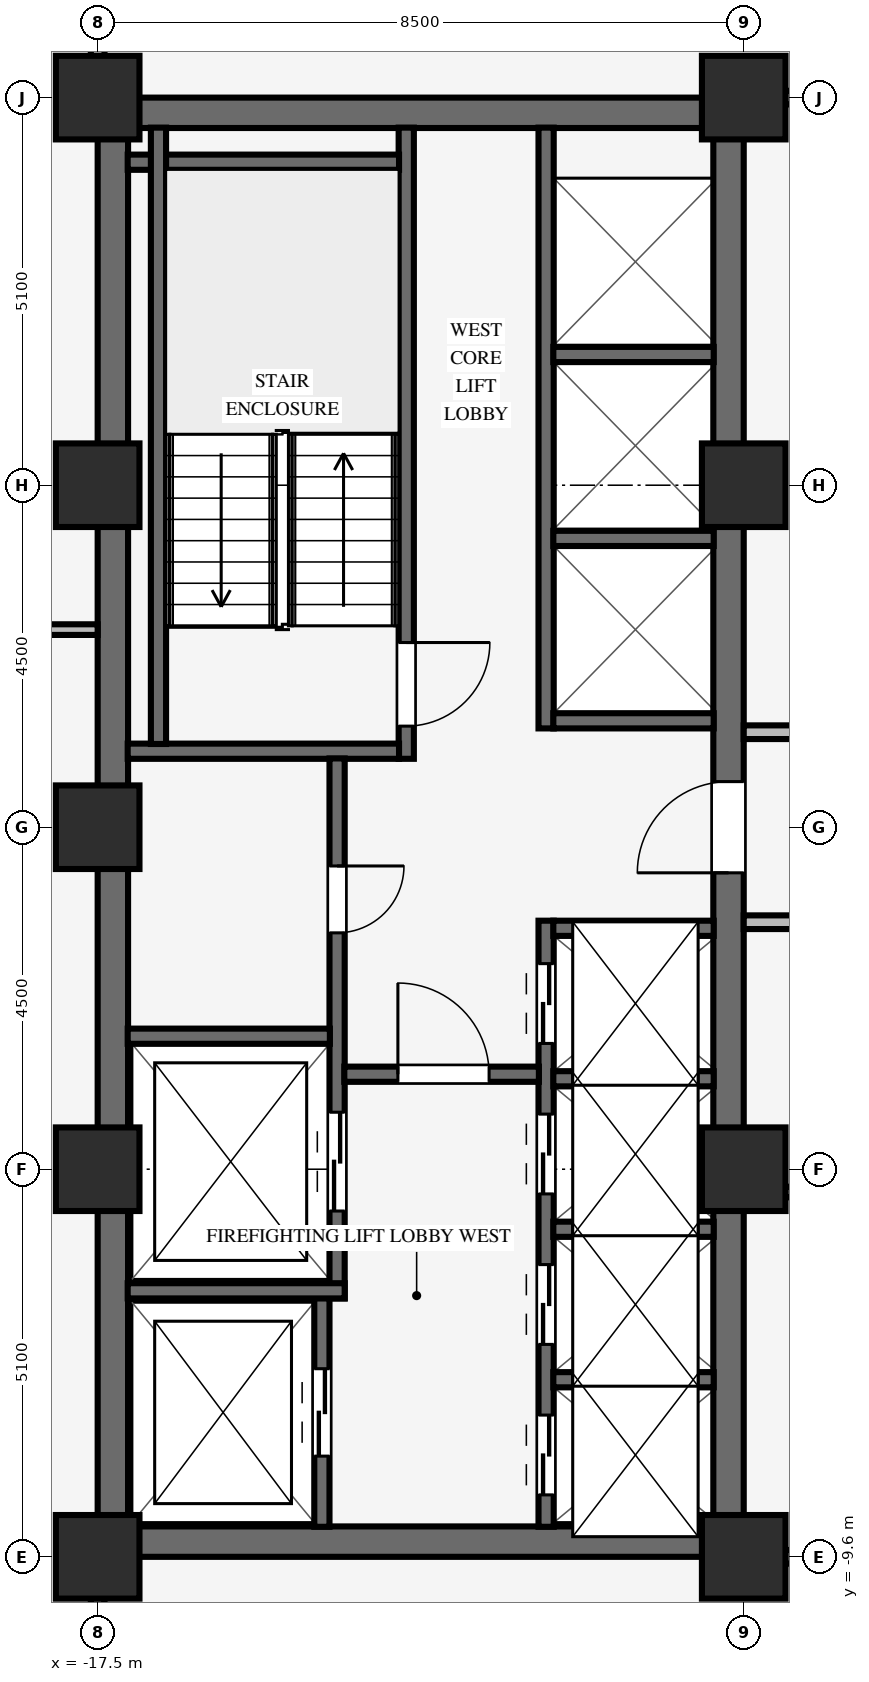
"""IFC4 building model, lengths in metres.
Left out: names, types, materials, properties, quantities, classifications, styles, units other than length and angle.
Written with IfcOpenShell. Run it as: python <this file> out.ifc"""

import sys

from ifc_helpers import new_model, si_unit, direction, frame, frame_2d, origin, origin_2d, place, context, subcontext, project, spatial, rectangle, extrude, source, transform, mapped, element, fill, save


model = new_model("IFC4")
c1 = context("Model", 3, precision=1e-05, world=origin(), true_north=direction((0.0, 1.0)))
c2 = subcontext(c1, "Body", "Model", "MODEL_VIEW")
j1 = project(units=[si_unit("LENGTHUNIT", "METRE"), si_unit("PLANEANGLEUNIT", "RADIAN")], contexts=[c1])
p1 = place(None, origin())
s1 = spatial("IfcSite", under=j1, at=p1, CompositionType="ELEMENT")
p2 = place(p1, origin())
s2 = spatial("IfcBuilding", under=s1, at=p2, CompositionType="ELEMENT")
p3 = place(p2, frame((0.0, 0.0, 112.9)))
s3 = spatial("IfcBuildingStorey", under=s2, at=p3, CompositionType="ELEMENT", Elevation=112.9)
for number, where, z_axis, x_axis in (
    (1, (-17.5, -9.4, 0.0), (0.0, 0.0, 1.0), (1.0, 0.0, 0.0)),
    (2, (-17.5, 9.4, 0.0), (0.0, 0.0, 1.0), (1.0, 0.0, 0.0)),
):
    element("IfcWall", number, at=place(p3, frame(where, z_axis=z_axis, x_axis=x_axis)), inside=s3, PredefinedType="SHEAR", context=c2, shape_type="SweptSolid", body=[
        extrude(rectangle(XDim=8.5, YDim=0.4, at=frame_2d((4.25, 0.0))), origin(), (0.0, 0.0, 1.0), 3.25),
    ])
p4 = place(p3, frame((-17.3, -9.205, 0.0), z_axis=(0.0, 0.0, 1.0), x_axis=(0.0, 1.0, 0.0)))
e3 = element("IfcWall", 3, at=p4, inside=s3, PredefinedType="SHEAR", context=c2, shape_type="SweptSolid", body=[
    extrude(rectangle(XDim=18.41, YDim=0.4, at=frame_2d((9.205, 0.0))), origin(), (0.0, 0.0, 1.0), 3.25),
])
p5 = place(p3, frame((-9.2, -9.205, 0.0), z_axis=(0.0, 0.0, 1.0), x_axis=(0.0, 1.0, 0.0)))
e4 = element("IfcWall", 4, at=p5, inside=s3, PredefinedType="SHEAR", context=c2, shape_type="SweptSolid", body=[
    extrude(rectangle(XDim=18.41, YDim=0.4, at=frame_2d((9.205, 0.0))), origin(), (0.0, 0.0, 1.0), 3.25),
])
p6 = place(p5, frame((8.605, 0.0, 0.0)))
e5 = element("IfcOpeningElement", 5, at=p6, cuts=e4, PredefinedType="OPENING", context=c2, shape_type="SweptSolid", body=[
    extrude(rectangle(XDim=1.2, YDim=2.15, at=frame_2d((0.6, 1.075))), frame((0.0, 0.21, 0.0), z_axis=(0.0, -1.0, 0.0), x_axis=(1.0, 0.0, 0.0)), (0.0, 0.0, 1.0), 0.42),
])
for number, where, z_axis, x_axis in (
    (6, (-17.5, -9.6, 0.0), (0.0, 0.0, 1.0), (1.0, 0.0, 0.0)),
    (7, (-17.5, -4.5, 0.0), (0.0, 0.0, 1.0), (1.0, 0.0, 0.0)),
    (8, (-17.5, 4.5, 0.0), (0.0, 0.0, 1.0), (1.0, 0.0, 0.0)),
    (9, (-17.5, 9.6, 0.0), (0.0, 0.0, 1.0), (1.0, 0.0, 0.0)),
    (10, (-9.0, -9.6, 0.0), (0.0, 0.0, 1.0), (1.0, 0.0, 0.0)),
    (11, (-9.0, -4.5, 0.0), (0.0, 0.0, 1.0), (1.0, 0.0, 0.0)),
    (12, (-9.0, 4.5, 0.0), (0.0, 0.0, 1.0), (1.0, 0.0, 0.0)),
    (13, (-9.0, 9.6, 0.0), (0.0, 0.0, 1.0), (1.0, 0.0, 0.0)),
    (14, (-17.5, 0.0, 0.0), (0.0, 0.0, 1.0), (1.0, 0.0, 0.0)),
):
    element("IfcColumn", number, at=place(p3, frame(where, z_axis=z_axis, x_axis=x_axis)), inside=s3, PredefinedType="COLUMN", context=c2, shape_type="SweptSolid", body=[
        extrude(rectangle(XDim=1.1, YDim=1.1, at=origin_2d()), origin(), (0.0, 0.0, 1.0), 3.25),
    ])
p7 = place(p3, frame((-13.44, 0.9, 0.0), z_axis=(0.0, 0.0, 1.0), x_axis=(0.0, 1.0, 0.0)))
e15 = element("IfcWall", 15, at=p7, inside=s3, PredefinedType="SHEAR", context=c2, shape_type="SweptSolid", body=[
    extrude(rectangle(XDim=8.305, YDim=0.2, at=frame_2d((4.153, 0.0))), origin(), (0.0, 0.0, 1.0), 3.25),
])
p8 = place(p7, frame((1.53, 0.0, 0.0), z_axis=(0.0, 0.0, 1.0), x_axis=(-1.0, 0.0, 0.0)))
e16 = element("IfcOpeningElement", 16, at=p8, cuts=e15, PredefinedType="OPENING", context=c2, shape_type="SweptSolid", body=[
    extrude(rectangle(XDim=1.1, YDim=2.15, at=frame_2d((0.55, 1.075))), frame((0.0, 0.11, 0.0), z_axis=(0.0, -1.0, 0.0), x_axis=(1.0, 0.0, 0.0)), (0.0, 0.0, 1.0), 0.22),
])
for number, where, z_axis, x_axis in (
    (17, (-17.105, 1.0, 0.0), (0.0, 0.0, 1.0), (1.0, 0.0, 0.0)),
    (18, (-17.105, 8.75, 0.0), (0.0, 0.0, 1.0), (1.0, 0.0, 0.0)),
):
    element("IfcWall", number, at=place(p3, frame(where, z_axis=z_axis, x_axis=x_axis)), inside=s3, PredefinedType="SHEAR", context=c2, shape_type="SweptSolid", body=[
        extrude(rectangle(XDim=3.57, YDim=0.2, at=frame_2d((1.785, 0.0))), origin(), (0.0, 0.0, 1.0), 3.25),
    ])
p9 = place(p3, frame((-16.7, 1.095, 0.0), z_axis=(0.0, 0.0, 1.0), x_axis=(0.0, 1.0, 0.0)))
e19 = element("IfcWall", 19, at=p9, inside=s3, PredefinedType="SHEAR", context=c2, shape_type="SweptSolid", body=[
    extrude(rectangle(XDim=8.11, YDim=0.2, at=frame_2d((4.055, 0.0))), origin(), (0.0, 0.0, 1.0), 3.25),
])
p10 = place(p3, frame((-14.55, -9.205, 0.0), z_axis=(0.0, 0.0, 1.0), x_axis=(0.0, 1.0, 0.0)))
e20 = element("IfcWall", 20, at=p10, inside=s3, PredefinedType="SHEAR", context=c2, shape_type="SweptSolid", body=[
    extrude(rectangle(XDim=3.01, YDim=0.2, at=frame_2d((1.505, 0.0))), origin(), (0.0, 0.0, 1.0), 3.25),
])
p11 = place(p10, frame((0.93, 0.0, 0.0)))
e21 = element("IfcOpeningElement", 21, at=p11, cuts=e20, PredefinedType="OPENING", context=c2, shape_type="SweptSolid", body=[
    extrude(rectangle(XDim=1.15, YDim=2.15, at=frame_2d((0.575, 1.075))), frame((0.0, 0.11, 0.0), z_axis=(0.0, -1.0, 0.0), x_axis=(1.0, 0.0, 0.0)), (0.0, 0.0, 1.0), 0.22),
])
p12 = place(p3, frame((-14.35, -6.2, 0.0), z_axis=(0.0, 0.0, 1.0), x_axis=(0.0, 1.0, 0.0)))
e22 = element("IfcWall", 22, at=p12, inside=s3, PredefinedType="SHEAR", context=c2, shape_type="SweptSolid", body=[
    extrude(rectangle(XDim=7.105, YDim=0.2, at=frame_2d((3.552, 0.0))), origin(), (0.0, 0.0, 1.0), 3.25),
])
p13 = place(p12, frame((5.69, 0.0, 0.0), z_axis=(0.0, 0.0, 1.0), x_axis=(-1.0, 0.0, 0.0)))
e23 = element("IfcOpeningElement", 23, at=p13, cuts=e22, PredefinedType="OPENING", context=c2, shape_type="SweptSolid", body=[
    extrude(rectangle(XDim=0.88, YDim=2.1, at=frame_2d((0.44, 1.05))), frame((0.0, 0.11, 0.0), z_axis=(0.0, -1.0, 0.0), x_axis=(1.0, 0.0, 0.0)), (0.0, 0.0, 1.0), 0.22),
])
p14 = place(p12, frame((1.15, 0.0, 0.0)))
e24 = element("IfcOpeningElement", 24, at=p14, cuts=e22, PredefinedType="OPENING", context=c2, shape_type="SweptSolid", body=[
    extrude(rectangle(XDim=1.3, YDim=2.2, at=frame_2d((0.65, 1.1))), frame((0.0, 0.11, 0.0), z_axis=(0.0, -1.0, 0.0), x_axis=(1.0, 0.0, 0.0)), (0.0, 0.0, 1.0), 0.22),
])
p15 = place(p3, frame((-17.105, -6.1, 0.0), z_axis=(0.0, 0.0, 1.0), x_axis=(1.0, 0.0, 0.0)))
e25 = element("IfcWall", 25, at=p15, inside=s3, PredefinedType="SHEAR", context=c2, shape_type="SweptSolid", body=[
    extrude(rectangle(XDim=2.855, YDim=0.2, at=frame_2d((1.427, 0.0))), origin(), (0.0, 0.0, 1.0), 3.25),
])
p16 = place(p3, frame((-17.105, -2.75, 0.0), z_axis=(0.0, 0.0, 1.0), x_axis=(1.0, 0.0, 0.0)))
e26 = element("IfcWall", 26, at=p16, inside=s3, PredefinedType="SHEAR", context=c2, shape_type="SweptSolid", body=[
    extrude(rectangle(XDim=2.66, YDim=0.2, at=frame_2d((1.33, 0.0))), origin(), (0.0, 0.0, 1.0), 3.25),
])
p17 = place(p3, frame((-11.6, -9.205, 0.0), z_axis=(0.0, 0.0, 1.0), x_axis=(0.0, 1.0, 0.0)))
e27 = element("IfcWall", 27, at=p17, inside=s3, PredefinedType="SHEAR", context=c2, shape_type="SweptSolid", body=[
    extrude(rectangle(XDim=7.975, YDim=0.2, at=frame_2d((3.988, 0.0))), origin(), (0.0, 0.0, 1.0), 3.25),
])
p18 = place(p17, frame((0.42, 0.0, 0.0)))
e28 = element("IfcOpeningElement", 28, at=p18, cuts=e27, PredefinedType="OPENING", context=c2, shape_type="SweptSolid", body=[
    extrude(rectangle(XDim=1.05, YDim=2.15, at=frame_2d((0.525, 1.075))), frame((0.0, 0.11, 0.0), z_axis=(0.0, -1.0, 0.0), x_axis=(1.0, 0.0, 0.0)), (0.0, 0.0, 1.0), 0.22),
])
p19 = place(p17, frame((2.4, 0.0, 0.0)))
e29 = element("IfcOpeningElement", 29, at=p19, cuts=e27, PredefinedType="OPENING", context=c2, shape_type="SweptSolid", body=[
    extrude(rectangle(XDim=1.05, YDim=2.15, at=frame_2d((0.525, 1.075))), frame((0.0, 0.11, 0.0), z_axis=(0.0, -1.0, 0.0), x_axis=(1.0, 0.0, 0.0)), (0.0, 0.0, 1.0), 0.22),
])
p20 = place(p17, frame((4.38, 0.0, 0.0)))
e30 = element("IfcOpeningElement", 30, at=p20, cuts=e27, PredefinedType="OPENING", context=c2, shape_type="SweptSolid", body=[
    extrude(rectangle(XDim=1.05, YDim=2.15, at=frame_2d((0.525, 1.075))), frame((0.0, 0.11, 0.0), z_axis=(0.0, -1.0, 0.0), x_axis=(1.0, 0.0, 0.0)), (0.0, 0.0, 1.0), 0.22),
])
p21 = place(p17, frame((6.36, 0.0, 0.0)))
e31 = element("IfcOpeningElement", 31, at=p21, cuts=e27, PredefinedType="OPENING", context=c2, shape_type="SweptSolid", body=[
    extrude(rectangle(XDim=1.05, YDim=2.15, at=frame_2d((0.525, 1.075))), frame((0.0, 0.11, 0.0), z_axis=(0.0, -1.0, 0.0), x_axis=(1.0, 0.0, 0.0)), (0.0, 0.0, 1.0), 0.22),
])
p22 = place(p3, frame((-14.255, -3.25, 0.0), z_axis=(0.0, 0.0, 1.0), x_axis=(1.0, 0.0, 0.0)))
e32 = element("IfcWall", 32, at=p22, inside=s3, PredefinedType="SHEAR", context=c2, shape_type="SweptSolid", body=[
    extrude(rectangle(XDim=2.56, YDim=0.2, at=frame_2d((1.28, 0.0))), origin(), (0.0, 0.0, 1.0), 3.25),
])
p23 = place(p22, frame((0.705, 0.0, 0.0)))
e33 = element("IfcOpeningElement", 33, at=p23, cuts=e32, PredefinedType="OPENING", context=c2, shape_type="SweptSolid", body=[
    extrude(rectangle(XDim=1.2, YDim=2.15, at=frame_2d((0.6, 1.075))), frame((0.0, 0.11, 0.0), z_axis=(0.0, -1.0, 0.0), x_axis=(1.0, 0.0, 0.0)), (0.0, 0.0, 1.0), 0.22),
])
for number, where, z_axis, x_axis in (
    (34, (-11.505, -7.27, 0.0), (0.0, 0.0, 1.0), (1.0, 0.0, 0.0)),
    (35, (-11.505, -5.29, 0.0), (0.0, 0.0, 1.0), (1.0, 0.0, 0.0)),
    (36, (-11.505, -3.31, 0.0), (0.0, 0.0, 1.0), (1.0, 0.0, 0.0)),
    (37, (-11.505, -1.33, 0.0), (0.0, 0.0, 1.0), (1.0, 0.0, 0.0)),
):
    element("IfcWall", number, at=place(p3, frame(where, z_axis=z_axis, x_axis=x_axis)), inside=s3, PredefinedType="SHEAR", context=c2, shape_type="SweptSolid", body=[
        extrude(rectangle(XDim=2.11, YDim=0.2, at=frame_2d((1.055, 0.0))), origin(), (0.0, 0.0, 1.0), 3.25),
    ])
p24 = place(p3, frame((-11.6, 1.3, 0.0), z_axis=(0.0, 0.0, 1.0), x_axis=(0.0, 1.0, 0.0)))
e38 = element("IfcWall", 38, at=p24, inside=s3, PredefinedType="SHEAR", context=c2, shape_type="SweptSolid", body=[
    extrude(rectangle(XDim=7.905, YDim=0.2, at=frame_2d((3.953, 0.0))), origin(), (0.0, 0.0, 1.0), 3.25),
])
for number, where, z_axis, x_axis in (
    (39, (-11.505, 1.4, 0.0), (0.0, 0.0, 1.0), (1.0, 0.0, 0.0)),
    (40, (-11.505, 3.8, 0.0), (0.0, 0.0, 1.0), (1.0, 0.0, 0.0)),
    (41, (-11.505, 6.22, 0.0), (0.0, 0.0, 1.0), (1.0, 0.0, 0.0)),
):
    element("IfcWall", number, at=place(p3, frame(where, z_axis=z_axis, x_axis=x_axis)), inside=s3, PredefinedType="SHEAR", context=c2, shape_type="SweptSolid", body=[
        extrude(rectangle(XDim=2.11, YDim=0.2, at=frame_2d((1.055, 0.0))), origin(), (0.0, 0.0, 1.0), 3.25),
    ])
p25 = place(p3, frame((-8.454, -9.6, 0.0), z_axis=(0.0, 0.0, 1.0), x_axis=(1.0, 0.0, 0.0)))
e42 = element("IfcWall", 42, at=p25, inside=s3, PredefinedType="PARTITIONING", context=c2, shape_type="SweptSolid", body=[
    extrude(rectangle(XDim=5.254, YDim=0.18, at=frame_2d((2.627, 0.0))), origin(), (0.0, 0.0, 1.0), 2.285),
])
p26 = place(p25, frame((2.147, 0.0, 0.0)))
e43 = element("IfcOpeningElement", 43, at=p26, cuts=e42, PredefinedType="OPENING", context=c2, shape_type="SweptSolid", body=[
    extrude(rectangle(XDim=0.96, YDim=2.1, at=frame_2d((0.48, 1.05))), frame((0.0, 0.1, 0.0), z_axis=(0.0, -1.0, 0.0), x_axis=(1.0, 0.0, 0.0)), (0.0, 0.0, 1.0), 0.2),
])
p27 = place(p3, frame((-8.454, -4.8, 0.0), z_axis=(0.0, 0.0, 1.0), x_axis=(1.0, 0.0, 0.0)))
e44 = element("IfcWall", 44, at=p27, inside=s3, PredefinedType="PARTITIONING", context=c2, shape_type="SweptSolid", body=[
    extrude(rectangle(XDim=5.168, YDim=0.14, at=frame_2d((2.584, 0.0))), origin(), (0.0, 0.0, 1.0), 2.618),
])
p28 = place(p3, frame((-9.0, -1.25, 0.0), z_axis=(0.0, 0.0, 1.0), x_axis=(1.0, 0.0, 0.0)))
e45 = element("IfcWall", 45, at=p28, inside=s3, PredefinedType="PARTITIONING", context=c2, shape_type="SweptSolid", body=[
    extrude(rectangle(XDim=5.8, YDim=0.18, at=frame_2d((2.9, 0.0))), origin(), (0.0, 0.0, 1.0), 3.24),
])
p29 = place(p28, frame((2.42, 0.0, 0.0)))
e46 = element("IfcOpeningElement", 46, at=p29, cuts=e45, PredefinedType="OPENING", context=c2, shape_type="SweptSolid", body=[
    extrude(rectangle(XDim=0.96, YDim=2.1, at=frame_2d((0.48, 1.05))), frame((0.0, 0.1, 0.0), z_axis=(0.0, -1.0, 0.0), x_axis=(1.0, 0.0, 0.0)), (0.0, 0.0, 1.0), 0.2),
])
p30 = place(p3, frame((-9.0, 1.25, 0.0), z_axis=(0.0, 0.0, 1.0), x_axis=(1.0, 0.0, 0.0)))
e47 = element("IfcWall", 47, at=p30, inside=s3, PredefinedType="PARTITIONING", context=c2, shape_type="SweptSolid", body=[
    extrude(rectangle(XDim=5.8, YDim=0.18, at=frame_2d((2.9, 0.0))), origin(), (0.0, 0.0, 1.0), 3.24),
])
p31 = place(p3, frame((-23.68, 2.6, 0.0), z_axis=(0.0, 0.0, 1.0), x_axis=(1.0, 0.0, 0.0)))
e48 = element("IfcWall", 48, at=p31, inside=s3, PredefinedType="PARTITIONING", context=c2, shape_type="SweptSolid", body=[
    extrude(rectangle(XDim=6.18, YDim=0.14, at=frame_2d((3.09, 0.0))), origin(), (0.0, 0.0, 1.0), 3.24),
])
p32 = place(p3, frame((-8.454, 9.6, 0.0), z_axis=(0.0, 0.0, 1.0), x_axis=(1.0, 0.0, 0.0)))
e49 = element("IfcWall", 49, at=p32, inside=s3, PredefinedType="PARTITIONING", context=c2, shape_type="SweptSolid", body=[
    extrude(rectangle(XDim=5.254, YDim=0.18, at=frame_2d((2.627, 0.0))), origin(), (0.0, 0.0, 1.0), 2.285),
])
for number, where, z_axis, x_axis in (
    (50, (-17.5, -11.114, 0.0), (0.0, 0.0, 1.0), (0.0, 1.0, 0.0)),
    (51, (-17.5, 10.146, 0.0), (0.0, 0.0, 1.0), (0.0, 1.0, 0.0)),
):
    element("IfcWall", number, at=place(p3, frame(where, z_axis=z_axis, x_axis=x_axis)), inside=s3, PredefinedType="PARTITIONING", context=c2, shape_type="SweptSolid", body=[
        extrude(rectangle(XDim=0.968, YDim=0.18, at=frame_2d((0.484, 0.0))), origin(), (0.0, 0.0, 1.0), 2.618),
    ])
m1 = source(origin(), c2, "Body", "SweptSolid", [
    extrude(rectangle(XDim=1.1, YDim=2.15, at=frame_2d((0.55, 1.075))), frame((0.0, 0.025, 0.0), z_axis=(0.0, -1.0, 0.0), x_axis=(1.0, 0.0, 0.0)), (0.0, 0.0, 1.0), 0.05),
])
p33 = place(p8, origin())
e52 = element("IfcDoor", 52, at=p33, inside=s3, OperationType="SINGLE_SWING_LEFT", PredefinedType="DOOR", context=c2, shape_type="MappedRepresentation", body=[
    mapped(m1, transform((0.0, 0.0, 0.0), scale=1.0)),
])
fill(e16, e52)
m2 = source(origin(), c2, "Body", "SweptSolid", [
    extrude(rectangle(XDim=0.88, YDim=2.1, at=frame_2d((0.44, 1.05))), frame((0.0, 0.025, 0.0), z_axis=(0.0, -1.0, 0.0), x_axis=(1.0, 0.0, 0.0)), (0.0, 0.0, 1.0), 0.05),
])
p34 = place(p13, origin())
e53 = element("IfcDoor", 53, at=p34, inside=s3, OperationType="SINGLE_SWING_LEFT", PredefinedType="DOOR", context=c2, shape_type="MappedRepresentation", body=[
    mapped(m2, transform((0.0, 0.0, 0.0), scale=1.0)),
])
fill(e23, e53)
m3 = source(origin(), c2, "Body", "SweptSolid", [
    extrude(rectangle(XDim=1.2, YDim=2.15, at=frame_2d((0.6, 1.075))), frame((0.0, 0.025, 0.0), z_axis=(0.0, -1.0, 0.0), x_axis=(1.0, 0.0, 0.0)), (0.0, 0.0, 1.0), 0.05),
])
p35 = place(p23, origin())
e54 = element("IfcDoor", 54, at=p35, inside=s3, OperationType="SINGLE_SWING_LEFT", PredefinedType="DOOR", context=c2, shape_type="MappedRepresentation", body=[
    mapped(m3, transform((0.0, 0.0, 0.0), scale=1.0)),
])
fill(e33, e54)
p36 = place(p6, origin())
e55 = element("IfcDoor", 55, at=p36, inside=s3, OperationType="SINGLE_SWING_LEFT", PredefinedType="DOOR", context=c2, shape_type="MappedRepresentation", body=[
    mapped(m3, transform((0.0, 0.0, 0.0), scale=1.0)),
])
fill(e5, e55)
m4 = source(origin(), c2, "Body", "SweptSolid", [
    extrude(rectangle(XDim=1.15, YDim=2.15, at=frame_2d((0.575, 1.075))), frame((0.0, 0.025, 0.0), z_axis=(0.0, -1.0, 0.0), x_axis=(1.0, 0.0, 0.0)), (0.0, 0.0, 1.0), 0.05),
])
p37 = place(p11, origin())
e56 = element("IfcDoor", 56, at=p37, inside=s3, OperationType="DOUBLE_DOOR_SLIDING", PredefinedType="DOOR", context=c2, shape_type="MappedRepresentation", body=[
    mapped(m4, transform((0.0, 0.0, 0.0), scale=1.0)),
])
fill(e21, e56)
m5 = source(origin(), c2, "Body", "SweptSolid", [
    extrude(rectangle(XDim=1.3, YDim=2.2, at=frame_2d((0.65, 1.1))), frame((0.0, 0.025, 0.0), z_axis=(0.0, -1.0, 0.0), x_axis=(1.0, 0.0, 0.0)), (0.0, 0.0, 1.0), 0.05),
])
p38 = place(p14, origin())
e57 = element("IfcDoor", 57, at=p38, inside=s3, OperationType="DOUBLE_DOOR_SLIDING", PredefinedType="DOOR", context=c2, shape_type="MappedRepresentation", body=[
    mapped(m5, transform((0.0, 0.0, 0.0), scale=1.0)),
])
fill(e24, e57)
m6 = source(origin(), c2, "Body", "SweptSolid", [
    extrude(rectangle(XDim=1.05, YDim=2.15, at=frame_2d((0.525, 1.075))), frame((0.0, 0.025, 0.0), z_axis=(0.0, -1.0, 0.0), x_axis=(1.0, 0.0, 0.0)), (0.0, 0.0, 1.0), 0.05),
])
p39 = place(p18, origin())
e58 = element("IfcDoor", 58, at=p39, inside=s3, OperationType="DOUBLE_DOOR_SLIDING", PredefinedType="DOOR", context=c2, shape_type="MappedRepresentation", body=[
    mapped(m6, transform((0.0, 0.0, 0.0), scale=1.0)),
])
fill(e28, e58)
p40 = place(p19, origin())
e59 = element("IfcDoor", 59, at=p40, inside=s3, OperationType="DOUBLE_DOOR_SLIDING", PredefinedType="DOOR", context=c2, shape_type="MappedRepresentation", body=[
    mapped(m6, transform((0.0, 0.0, 0.0), scale=1.0)),
])
fill(e29, e59)
p41 = place(p20, origin())
e60 = element("IfcDoor", 60, at=p41, inside=s3, OperationType="DOUBLE_DOOR_SLIDING", PredefinedType="DOOR", context=c2, shape_type="MappedRepresentation", body=[
    mapped(m6, transform((0.0, 0.0, 0.0), scale=1.0)),
])
fill(e30, e60)
p42 = place(p21, origin())
e61 = element("IfcDoor", 61, at=p42, inside=s3, OperationType="DOUBLE_DOOR_SLIDING", PredefinedType="DOOR", context=c2, shape_type="MappedRepresentation", body=[
    mapped(m6, transform((0.0, 0.0, 0.0), scale=1.0)),
])
fill(e31, e61)
save(model, sys.argv[1])
